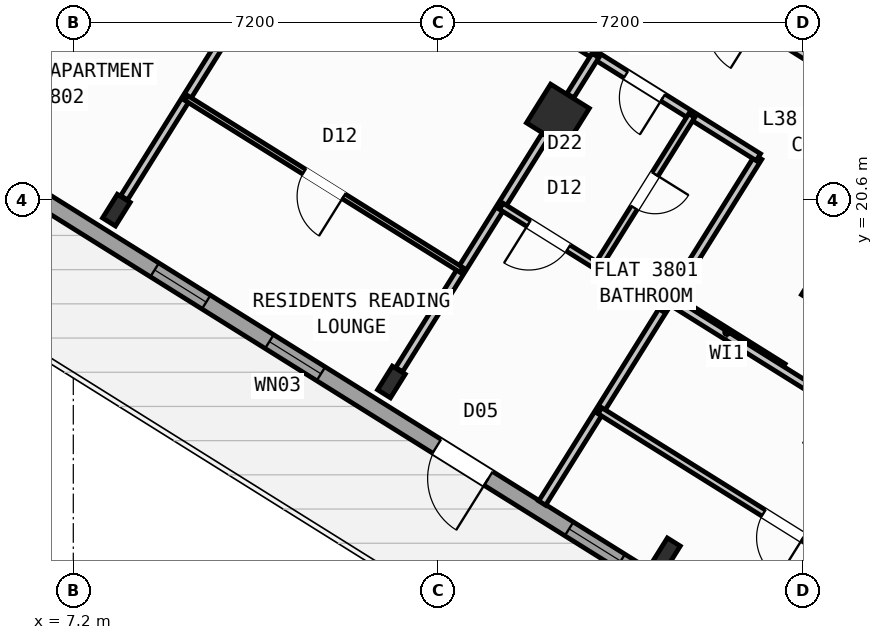
"""IFC4 building model, lengths in metres.
Left out: names, types, materials, properties, quantities, classifications, styles, units other than length and angle.
Written with IfcOpenShell. Run it as: python <this file> out.ifc"""

import sys

from ifc_helpers import new_model, si_unit, direction, frame, frame_2d, origin, origin_2d, place, context, subcontext, project, spatial, rectangle, hollow_rectangle, i_section, extrude, source, transform, mapped, element, fill, save


model = new_model("IFC4")
c1 = context("Model", 3, precision=1e-05, world=origin(), true_north=direction((0.0, 1.0)))
c2 = subcontext(c1, "Body", "Model", "MODEL_VIEW")
j1 = project(units=[si_unit("LENGTHUNIT", "METRE"), si_unit("PLANEANGLEUNIT", "RADIAN")], contexts=[c1])
p1 = place(None, origin())
s1 = spatial("IfcSite", under=j1, at=p1, CompositionType="ELEMENT")
p2 = place(p1, origin())
s2 = spatial("IfcBuilding", under=s1, at=p2, CompositionType="ELEMENT")
p3 = place(p2, frame((0.0, 0.0, 151.5)))
s3 = spatial("IfcBuildingStorey", under=s2, at=p3, CompositionType="ELEMENT", Elevation=151.5)
m1 = source(origin(), c2, "Body", "SweptSolid", [
    extrude(hollow_rectangle(XDim=0.9, YDim=0.9, WallThickness=0.036, at=origin_2d()), origin(), (0.0, 0.0, 1.0), 3.6),
])
p4 = place(p3, frame((22.191, 18.87, 0.0), z_axis=(0.0, 0.0, 1.0), x_axis=(-0.848048096156, 0.529919264233, 0.0)))
e1 = element("IfcColumn", 1, at=p4, inside=s3, PredefinedType="COLUMN", context=c2, shape_type="MappedRepresentation", body=[
    mapped(m1, transform((0.0, 0.0, 0.0), scale=1.0)),
])
m2 = source(origin(), c2, "Body", "SweptSolid", [
    extrude(i_section(OverallWidth=0.3, OverallDepth=0.55, WebThickness=0.015, FlangeThickness=0.029, at=origin_2d()), origin(), (0.0, 0.0, 1.0), 3.6),
])
p5 = place(p3, frame((18.906, 13.612, 0.0), z_axis=(0.0, 0.0, 1.0), x_axis=(-0.848048096156, 0.529919264233, 0.0)))
e2 = element("IfcColumn", 2, at=p5, inside=s3, PredefinedType="COLUMN", context=c2, shape_type="MappedRepresentation", body=[
    mapped(m2, transform((0.0, 0.0, 0.0), scale=1.0)),
])
p6 = place(p3, frame((16.764, 22.261, 0.0), z_axis=(0.0, 0.0, 1.0), x_axis=(-0.848048096156, 0.529919264233, 0.0)))
e3 = element("IfcColumn", 3, at=p6, inside=s3, PredefinedType="COLUMN", context=c2, shape_type="MappedRepresentation", body=[
    mapped(m1, transform((0.0, 0.0, 0.0), scale=1.0)),
])
for number, where, z_axis, x_axis in (
    (4, (13.478, 17.003, 0.0), (0.0, 0.0, 1.0), (-0.848, 0.53, 0.0)),
    (5, (8.051, 20.395, 0.0), (0.0, 0.0, 1.0), (-0.848, 0.53, 0.0)),
):
    element("IfcColumn", number, at=place(p3, frame(where, z_axis=z_axis, x_axis=x_axis)), inside=s3, PredefinedType="COLUMN", context=c2, shape_type="MappedRepresentation", body=[
        mapped(m2, transform((0.0, 0.0, 0.0), scale=1.0)),
    ])
p7 = place(p3, frame((29.268, 6.429, 0.0), z_axis=(0.0, 0.0, 1.0), x_axis=(-0.848049971435, 0.529916263149, 0.0)))
e6 = element("IfcWall", 6, at=p7, inside=s3, PredefinedType="STANDARD", context=c2, shape_type="SweptSolid", body=[
    extrude(rectangle(XDim=31.588, YDim=0.32, at=frame_2d((15.794, 0.0))), origin(), (0.0, 0.0, 1.0), 3.35),
])
p8 = place(p7, frame((16.362, 0.0, 0.0)))
e7 = element("IfcOpeningElement", 7, at=p8, cuts=e6, PredefinedType="OPENING", context=c2, shape_type="SweptSolid", body=[
    extrude(rectangle(XDim=1.2, YDim=2.15, at=frame_2d((0.6, 1.075))), frame((0.0, 0.17, 0.0), z_axis=(0.0, -1.0, 0.0), x_axis=(1.0, 0.0, 0.0)), (0.0, 0.0, 1.0), 0.34),
])
p9 = place(p7, frame((2.989, 0.0, 0.8)))
e8 = element("IfcOpeningElement", 8, at=p9, cuts=e6, PredefinedType="OPENING", context=c2, shape_type="SweptSolid", body=[
    extrude(rectangle(XDim=2.1, YDim=1.55, at=frame_2d((1.05, 0.775))), frame((0.0, 0.17, 0.0), z_axis=(0.0, -1.0, 0.0), x_axis=(1.0, 0.0, 0.0)), (0.0, 0.0, 1.0), 0.34),
])
p10 = place(p7, frame((8.359, 0.0, 0.8)))
e9 = element("IfcOpeningElement", 9, at=p10, cuts=e6, PredefinedType="OPENING", context=c2, shape_type="SweptSolid", body=[
    extrude(rectangle(XDim=2.1, YDim=1.55, at=frame_2d((1.05, 0.775))), frame((0.0, 0.17, 0.0), z_axis=(0.0, -1.0, 0.0), x_axis=(1.0, 0.0, 0.0)), (0.0, 0.0, 1.0), 0.34),
])
p11 = place(p7, frame((13.284, 0.0, 0.95)))
e10 = element("IfcOpeningElement", 10, at=p11, cuts=e6, PredefinedType="OPENING", context=c2, shape_type="SweptSolid", body=[
    extrude(rectangle(XDim=1.2, YDim=1.4, at=frame_2d((0.6, 0.7))), frame((0.0, 0.17, 0.0), z_axis=(0.0, -1.0, 0.0), x_axis=(1.0, 0.0, 0.0)), (0.0, 0.0, 1.0), 0.34),
])
p12 = place(p7, frame((20.259, 0.0, 0.95)))
e11 = element("IfcOpeningElement", 11, at=p12, cuts=e6, PredefinedType="OPENING", context=c2, shape_type="SweptSolid", body=[
    extrude(rectangle(XDim=1.2, YDim=1.4, at=frame_2d((0.6, 0.7))), frame((0.0, 0.17, 0.0), z_axis=(0.0, -1.0, 0.0), x_axis=(1.0, 0.0, 0.0)), (0.0, 0.0, 1.0), 0.34),
])
p13 = place(p7, frame((22.929, 0.0, 0.95)))
e12 = element("IfcOpeningElement", 12, at=p13, cuts=e6, PredefinedType="OPENING", context=c2, shape_type="SweptSolid", body=[
    extrude(rectangle(XDim=1.2, YDim=1.4, at=frame_2d((0.6, 0.7))), frame((0.0, 0.17, 0.0), z_axis=(0.0, -1.0, 0.0), x_axis=(1.0, 0.0, 0.0)), (0.0, 0.0, 1.0), 0.34),
])
p14 = place(p7, frame((27.481, 0.0, 0.8)))
e13 = element("IfcOpeningElement", 13, at=p14, cuts=e6, PredefinedType="OPENING", context=c2, shape_type="SweptSolid", body=[
    extrude(rectangle(XDim=2.1, YDim=1.55, at=frame_2d((1.05, 0.775))), frame((0.0, 0.17, 0.0), z_axis=(0.0, -1.0, 0.0), x_axis=(1.0, 0.0, 0.0)), (0.0, 0.0, 1.0), 0.34),
])
p15 = place(p3, frame((2.415, 23.452, 0.0), z_axis=(0.0, 0.0, 1.0), x_axis=(0.52991049553, 0.848053575387, 0.0)))
e14 = element("IfcWall", 14, at=p15, inside=s3, PredefinedType="STANDARD", context=c2, shape_type="SweptSolid", body=[
    extrude(rectangle(XDim=21.587, YDim=0.32, at=frame_2d((10.794, 0.0))), origin(), (0.0, 0.0, 1.0), 2.775),
])
p16 = place(p15, frame((1.406, 0.0, 0.8)))
e15 = element("IfcOpeningElement", 15, at=p16, cuts=e14, PredefinedType="OPENING", context=c2, shape_type="SweptSolid", body=[
    extrude(rectangle(XDim=2.1, YDim=1.55, at=frame_2d((1.05, 0.775))), frame((0.0, 0.17, 0.0), z_axis=(0.0, -1.0, 0.0), x_axis=(1.0, 0.0, 0.0)), (0.0, 0.0, 1.0), 0.34),
])
p17 = place(p15, frame((10.949, 0.0, 1.0)))
e16 = element("IfcOpeningElement", 16, at=p17, cuts=e14, PredefinedType="OPENING", context=c2, shape_type="SweptSolid", body=[
    extrude(rectangle(XDim=0.9, YDim=1.25, at=frame_2d((0.45, 0.625))), frame((0.0, 0.17, 0.0), z_axis=(0.0, -1.0, 0.0), x_axis=(1.0, 0.0, 0.0)), (0.0, 0.0, 1.0), 0.34),
])
p18 = place(p15, frame((15.369, 0.0, 0.85)))
e17 = element("IfcOpeningElement", 17, at=p18, cuts=e14, PredefinedType="OPENING", context=c2, shape_type="SweptSolid", body=[
    extrude(rectangle(XDim=1.5, YDim=1.5, at=frame_2d((0.75, 0.75))), frame((0.0, 0.17, 0.0), z_axis=(0.0, -1.0, 0.0), x_axis=(1.0, 0.0, 0.0)), (0.0, 0.0, 1.0), 0.34),
])
p19 = place(p15, frame((18.219, 0.0, 0.85)))
e18 = element("IfcOpeningElement", 18, at=p19, cuts=e14, PredefinedType="OPENING", context=c2, shape_type="SweptSolid", body=[
    extrude(rectangle(XDim=1.5, YDim=1.5, at=frame_2d((0.75, 0.75))), frame((0.0, 0.17, 0.0), z_axis=(0.0, -1.0, 0.0), x_axis=(1.0, 0.0, 0.0)), (0.0, 0.0, 1.0), 0.34),
])
p20 = place(p3, frame((21.206, 17.292, 0.0), z_axis=(0.0, 0.0, 1.0), x_axis=(-0.848050851465, 0.529914854792, 0.0)))
e19 = element("IfcWall", 19, at=p20, inside=s3, PredefinedType="PARTITIONING", context=c2, shape_type="SweptSolid", body=[
    extrude(rectangle(XDim=2.61, YDim=0.16, at=frame_2d((1.305, 0.0))), origin(), (0.0, 0.0, 1.0), 3.34),
])
p21 = place(p3, frame((20.719, 21.44, 0.0), z_axis=(0.0, 0.0, 1.0), x_axis=(-0.529906246318, -0.848056230514, 0.0)))
e20 = element("IfcWall", 20, at=p21, inside=s3, PredefinedType="PARTITIONING", context=c2, shape_type="SweptSolid", body=[
    extrude(rectangle(XDim=8.05, YDim=0.16, at=frame_2d((4.025, 0.0))), origin(), (0.0, 0.0, 1.0), 3.34),
])
p22 = place(p3, frame((21.885, 23.306, 0.0), z_axis=(0.0, 0.0, 1.0), x_axis=(-0.848052408131, 0.529912363569, 0.0)))
e21 = element("IfcWall", 21, at=p22, inside=s3, PredefinedType="PARTITIONING", context=c2, shape_type="SweptSolid", body=[
    extrude(rectangle(XDim=16.73, YDim=0.16, at=frame_2d((8.365, 0.0))), origin(), (0.0, 0.0, 1.0), 3.34),
])
p23 = place(p22, frame((1.395, 0.0, 0.0)))
e22 = element("IfcOpeningElement", 22, at=p23, cuts=e21, PredefinedType="OPENING", context=c2, shape_type="SweptSolid", body=[
    extrude(rectangle(XDim=1.0, YDim=2.1, at=frame_2d((0.5, 1.05))), frame((0.0, 0.09, 0.0), z_axis=(0.0, -1.0, 0.0), x_axis=(1.0, 0.0, 0.0)), (0.0, 0.0, 1.0), 0.18),
])
p24 = place(p22, frame((7.82, 0.0, 0.0)))
e23 = element("IfcOpeningElement", 23, at=p24, cuts=e21, PredefinedType="OPENING", context=c2, shape_type="SweptSolid", body=[
    extrude(rectangle(XDim=1.0, YDim=2.1, at=frame_2d((0.5, 1.05))), frame((0.0, 0.09, 0.0), z_axis=(0.0, -1.0, 0.0), x_axis=(1.0, 0.0, 0.0)), (0.0, 0.0, 1.0), 0.18),
])
p25 = place(p22, frame((11.14, 0.0, 0.0)))
e24 = element("IfcOpeningElement", 24, at=p25, cuts=e21, PredefinedType="OPENING", context=c2, shape_type="SweptSolid", body=[
    extrude(rectangle(XDim=1.0, YDim=2.1, at=frame_2d((0.5, 1.05))), frame((0.0, 0.09, 0.0), z_axis=(0.0, -1.0, 0.0), x_axis=(1.0, 0.0, 0.0)), (0.0, 0.0, 1.0), 0.18),
])
p26 = place(p3, frame((20.719, 21.44, 0.0), z_axis=(0.0, 0.0, 1.0), x_axis=(-0.848048310262, 0.529918921593, 0.0)))
e25 = element("IfcWall", 25, at=p26, inside=s3, PredefinedType="PARTITIONING", context=c2, shape_type="SweptSolid", body=[
    extrude(rectangle(XDim=16.73, YDim=0.16, at=frame_2d((8.365, 0.0))), origin(), (0.0, 0.0, 1.0), 3.34),
])
p27 = place(p26, frame((2.22, 0.0, 0.0)))
e26 = element("IfcOpeningElement", 26, at=p27, cuts=e25, PredefinedType="OPENING", context=c2, shape_type="SweptSolid", body=[
    extrude(rectangle(XDim=0.86, YDim=2.05, at=frame_2d((0.43, 1.025))), frame((0.0, 0.09, 0.0), z_axis=(0.0, -1.0, 0.0), x_axis=(1.0, 0.0, 0.0)), (0.0, 0.0, 1.0), 0.18),
])
p28 = place(p26, frame((6.49, 0.0, 0.0)))
e27 = element("IfcOpeningElement", 27, at=p28, cuts=e25, PredefinedType="OPENING", context=c2, shape_type="SweptSolid", body=[
    extrude(rectangle(XDim=1.0, YDim=2.1, at=frame_2d((0.5, 1.05))), frame((0.0, 0.09, 0.0), z_axis=(0.0, -1.0, 0.0), x_axis=(1.0, 0.0, 0.0)), (0.0, 0.0, 1.0), 0.18),
])
p29 = place(p26, frame((14.304, 0.0, 0.0)))
e28 = element("IfcOpeningElement", 28, at=p29, cuts=e25, PredefinedType="OPENING", context=c2, shape_type="SweptSolid", body=[
    extrude(rectangle(XDim=1.0, YDim=2.1, at=frame_2d((0.5, 1.05))), frame((0.0, 0.09, 0.0), z_axis=(0.0, -1.0, 0.0), x_axis=(1.0, 0.0, 0.0)), (0.0, 0.0, 1.0), 0.18),
])
p30 = place(p3, frame((17.506, 23.449, 0.0), z_axis=(0.0, 0.0, 1.0), x_axis=(-0.529835187763, -0.848100627171, 0.0)))
e29 = element("IfcWall", 29, at=p30, inside=s3, PredefinedType="PARTITIONING", context=c2, shape_type="SweptSolid", body=[
    extrude(rectangle(XDim=0.938, YDim=0.16, at=frame_2d((0.469, 0.0))), origin(), (0.0, 0.0, 1.0), 2.775),
])
p31 = place(p3, frame((16.519, 21.87, 0.0), z_axis=(0.0, 0.0, 1.0), x_axis=(-0.529922447305, -0.848046107144, 0.0)))
e30 = element("IfcWall", 30, at=p31, inside=s3, PredefinedType="PARTITIONING", context=c2, shape_type="SweptSolid", body=[
    extrude(rectangle(XDim=5.451, YDim=0.16, at=frame_2d((2.726, 0.0))), origin(), (0.0, 0.0, 1.0), 2.775),
])
p32 = place(p3, frame((18.86, 18.464, 0.0), z_axis=(0.0, 0.0, 1.0), x_axis=(-0.848059820872, 0.529900500304, 0.0)))
e31 = element("IfcWall", 31, at=p32, inside=s3, PredefinedType="PLUMBINGWALL", context=c2, shape_type="SweptSolid", body=[
    extrude(rectangle(XDim=3.79, YDim=0.14, at=frame_2d((1.895, 0.0))), origin(), (0.0, 0.0, 1.0), 3.34),
])
p33 = place(p32, frame((2.23, 0.0, 0.0)))
e32 = element("IfcOpeningElement", 32, at=p33, cuts=e31, PredefinedType="OPENING", context=c2, shape_type="SweptSolid", body=[
    extrude(rectangle(XDim=0.92, YDim=2.08, at=frame_2d((0.46, 1.04))), frame((0.0, 0.08, 0.0), z_axis=(0.0, -1.0, 0.0), x_axis=(1.0, 0.0, 0.0)), (0.0, 0.0, 1.0), 0.16),
])
p34 = place(p3, frame((19.405, 22.261, 0.0), z_axis=(0.0, 0.0, 1.0), x_axis=(-0.529898896701, -0.848060822863, 0.0)))
e33 = element("IfcWall", 33, at=p34, inside=s3, PredefinedType="PLUMBINGWALL", context=c2, shape_type="SweptSolid", body=[
    extrude(rectangle(XDim=3.51, YDim=0.14, at=frame_2d((1.755, 0.0))), origin(), (0.0, 0.0, 1.0), 2.995),
])
p35 = place(p34, frame((1.365, 0.0, 0.0)))
e34 = element("IfcOpeningElement", 34, at=p35, cuts=e33, PredefinedType="OPENING", context=c2, shape_type="SweptSolid", body=[
    extrude(rectangle(XDim=0.78, YDim=2.05, at=frame_2d((0.39, 1.025))), frame((0.0, 0.08, 0.0), z_axis=(0.0, -1.0, 0.0), x_axis=(1.0, 0.0, 0.0)), (0.0, 0.0, 1.0), 0.16),
])
p36 = place(p3, frame((11.091, 25.261, 0.0), z_axis=(0.0, 0.0, 1.0), x_axis=(-0.52994257524, -0.848033529377, 0.0)))
e35 = element("IfcWall", 35, at=p36, inside=s3, PredefinedType="PARTITIONING", context=c2, shape_type="SweptSolid", body=[
    extrude(rectangle(XDim=5.451, YDim=0.16, at=frame_2d((2.726, 0.0))), origin(), (0.0, 0.0, 1.0), 2.775),
])
p37 = place(p3, frame((14.86, 19.215, 0.0), z_axis=(0.0, 0.0, 1.0), x_axis=(-0.848039019877, 0.529933789039, 0.0)))
e36 = element("IfcWall", 36, at=p37, inside=s3, PredefinedType="PARTITIONING", context=c2, shape_type="SweptSolid", body=[
    extrude(rectangle(XDim=6.4, YDim=0.11, at=frame_2d((3.2, 0.0))), origin(), (0.0, 0.0, 1.0), 3.34),
])
p38 = place(p37, frame((2.74, 0.0, 0.0)))
e37 = element("IfcOpeningElement", 37, at=p38, cuts=e36, PredefinedType="OPENING", context=c2, shape_type="SweptSolid", body=[
    extrude(rectangle(XDim=0.92, YDim=2.08, at=frame_2d((0.46, 1.04))), frame((0.0, 0.065, 0.0), z_axis=(0.0, -1.0, 0.0), x_axis=(1.0, 0.0, 0.0)), (0.0, 0.0, 1.0), 0.13),
])
p39 = place(p3, frame((32.164, 10.374, 0.0), z_axis=(0.0, 0.0, 1.0), x_axis=(-0.848044107957, 0.529925646633, 0.0)))
e38 = element("IfcWall", 38, at=p39, inside=s3, PredefinedType="PARTITIONING", context=c2, shape_type="SweptSolid", body=[
    extrude(rectangle(XDim=15.57, YDim=0.16, at=frame_2d((7.785, 0.0))), origin(), (0.0, 0.0, 1.0), 3.34),
])
p40 = place(p39, frame((10.83, 0.0, 0.0)))
e39 = element("IfcOpeningElement", 39, at=p40, cuts=e38, PredefinedType="OPENING", context=c2, shape_type="SweptSolid", body=[
    extrude(rectangle(XDim=1.0, YDim=2.1, at=frame_2d((0.5, 1.05))), frame((0.0, 0.09, 0.0), z_axis=(0.0, -1.0, 0.0), x_axis=(1.0, 0.0, 0.0)), (0.0, 0.0, 1.0), 0.18),
])
p41 = place(p3, frame((29.72, 8.859, 0.0), z_axis=(0.0, 0.0, 1.0), x_axis=(-0.848049134363, 0.529917602752, 0.0)))
e40 = element("IfcWall", 40, at=p41, inside=s3, PredefinedType="PLUMBINGWALL", context=c2, shape_type="SweptSolid", body=[
    extrude(rectangle(XDim=14.3, YDim=0.14, at=frame_2d((7.15, 0.0))), origin(), (0.0, 0.0, 1.0), 3.34),
])
p42 = place(p41, frame((9.57, 0.0, 0.0)))
e41 = element("IfcOpeningElement", 41, at=p42, cuts=e40, PredefinedType="OPENING", context=c2, shape_type="SweptSolid", body=[
    extrude(rectangle(XDim=0.92, YDim=2.08, at=frame_2d((0.46, 1.04))), frame((0.0, 0.08, 0.0), z_axis=(0.0, -1.0, 0.0), x_axis=(1.0, 0.0, 0.0)), (0.0, 0.0, 1.0), 0.16),
])
m3 = source(origin(), c2, "Body", "SweptSolid", [
    extrude(rectangle(XDim=1.2, YDim=2.15, at=frame_2d((0.6, 1.075))), frame((0.0, 0.025, 0.0), z_axis=(0.0, -1.0, 0.0), x_axis=(1.0, 0.0, 0.0)), (0.0, 0.0, 1.0), 0.05),
])
p43 = place(p8, origin())
e42 = element("IfcDoor", 42, at=p43, inside=s3, OperationType="SINGLE_SWING_LEFT", PredefinedType="DOOR", context=c2, shape_type="MappedRepresentation", body=[
    mapped(m3, transform((0.0, 0.0, 0.0), scale=1.0)),
])
fill(e7, e42)
m4 = source(origin(), c2, "Body", "SweptSolid", [
    extrude(rectangle(XDim=1.2, YDim=1.4, at=frame_2d((0.6, 0.7))), frame((0.0, 0.03, 0.0), z_axis=(0.0, -1.0, 0.0), x_axis=(1.0, 0.0, 0.0)), (0.0, 0.0, 1.0), 0.06),
])
p44 = place(p11, origin())
e43 = element("IfcWindow", 43, at=p44, inside=s3, PartitioningType="SINGLE_PANEL", PredefinedType="WINDOW", context=c2, shape_type="MappedRepresentation", body=[
    mapped(m4, transform((0.0, 0.0, 0.0), scale=1.0)),
])
fill(e10, e43)
p45 = place(p12, origin())
e44 = element("IfcWindow", 44, at=p45, inside=s3, PartitioningType="SINGLE_PANEL", PredefinedType="WINDOW", context=c2, shape_type="MappedRepresentation", body=[
    mapped(m4, transform((0.0, 0.0, 0.0), scale=1.0)),
])
fill(e11, e44)
p46 = place(p13, origin())
e45 = element("IfcWindow", 45, at=p46, inside=s3, PartitioningType="SINGLE_PANEL", PredefinedType="WINDOW", context=c2, shape_type="MappedRepresentation", body=[
    mapped(m4, transform((0.0, 0.0, 0.0), scale=1.0)),
])
fill(e12, e45)
m5 = source(origin(), c2, "Body", "SweptSolid", [
    extrude(rectangle(XDim=0.86, YDim=2.05, at=frame_2d((0.43, 1.025))), frame((0.0, 0.025, 0.0), z_axis=(0.0, -1.0, 0.0), x_axis=(1.0, 0.0, 0.0)), (0.0, 0.0, 1.0), 0.05),
])
p47 = place(p27, origin())
e46 = element("IfcDoor", 46, at=p47, inside=s3, OperationType="SINGLE_SWING_LEFT", PredefinedType="DOOR", context=c2, shape_type="MappedRepresentation", body=[
    mapped(m5, transform((0.0, 0.0, 0.0), scale=1.0)),
])
fill(e26, e46)
m6 = source(origin(), c2, "Body", "SweptSolid", [
    extrude(rectangle(XDim=0.92, YDim=2.08, at=frame_2d((0.46, 1.04))), frame((0.0, 0.025, 0.0), z_axis=(0.0, -1.0, 0.0), x_axis=(1.0, 0.0, 0.0)), (0.0, 0.0, 1.0), 0.05),
])
p48 = place(p33, origin())
e47 = element("IfcDoor", 47, at=p48, inside=s3, OperationType="SINGLE_SWING_RIGHT", PredefinedType="DOOR", context=c2, shape_type="MappedRepresentation", body=[
    mapped(m6, transform((0.0, 0.0, 0.0), scale=1.0)),
])
fill(e32, e47)
m7 = source(origin(), c2, "Body", "SweptSolid", [
    extrude(rectangle(XDim=0.78, YDim=2.05, at=frame_2d((0.39, 1.025))), frame((0.0, 0.025, 0.0), z_axis=(0.0, -1.0, 0.0), x_axis=(1.0, 0.0, 0.0)), (0.0, 0.0, 1.0), 0.05),
])
p49 = place(p35, origin())
e48 = element("IfcDoor", 48, at=p49, inside=s3, OperationType="SINGLE_SWING_LEFT", PredefinedType="DOOR", context=c2, shape_type="MappedRepresentation", body=[
    mapped(m7, transform((0.0, 0.0, 0.0), scale=1.0)),
])
fill(e34, e48)
p50 = place(p38, origin())
e49 = element("IfcDoor", 49, at=p50, inside=s3, OperationType="SINGLE_SWING_LEFT", PredefinedType="DOOR", context=c2, shape_type="MappedRepresentation", body=[
    mapped(m6, transform((0.0, 0.0, 0.0), scale=1.0)),
])
fill(e37, e49)
p51 = place(p42, origin())
e50 = element("IfcDoor", 50, at=p51, inside=s3, OperationType="SINGLE_SWING_LEFT", PredefinedType="DOOR", context=c2, shape_type="MappedRepresentation", body=[
    mapped(m6, transform((0.0, 0.0, 0.0), scale=1.0)),
])
fill(e41, e50)
save(model, sys.argv[1])
